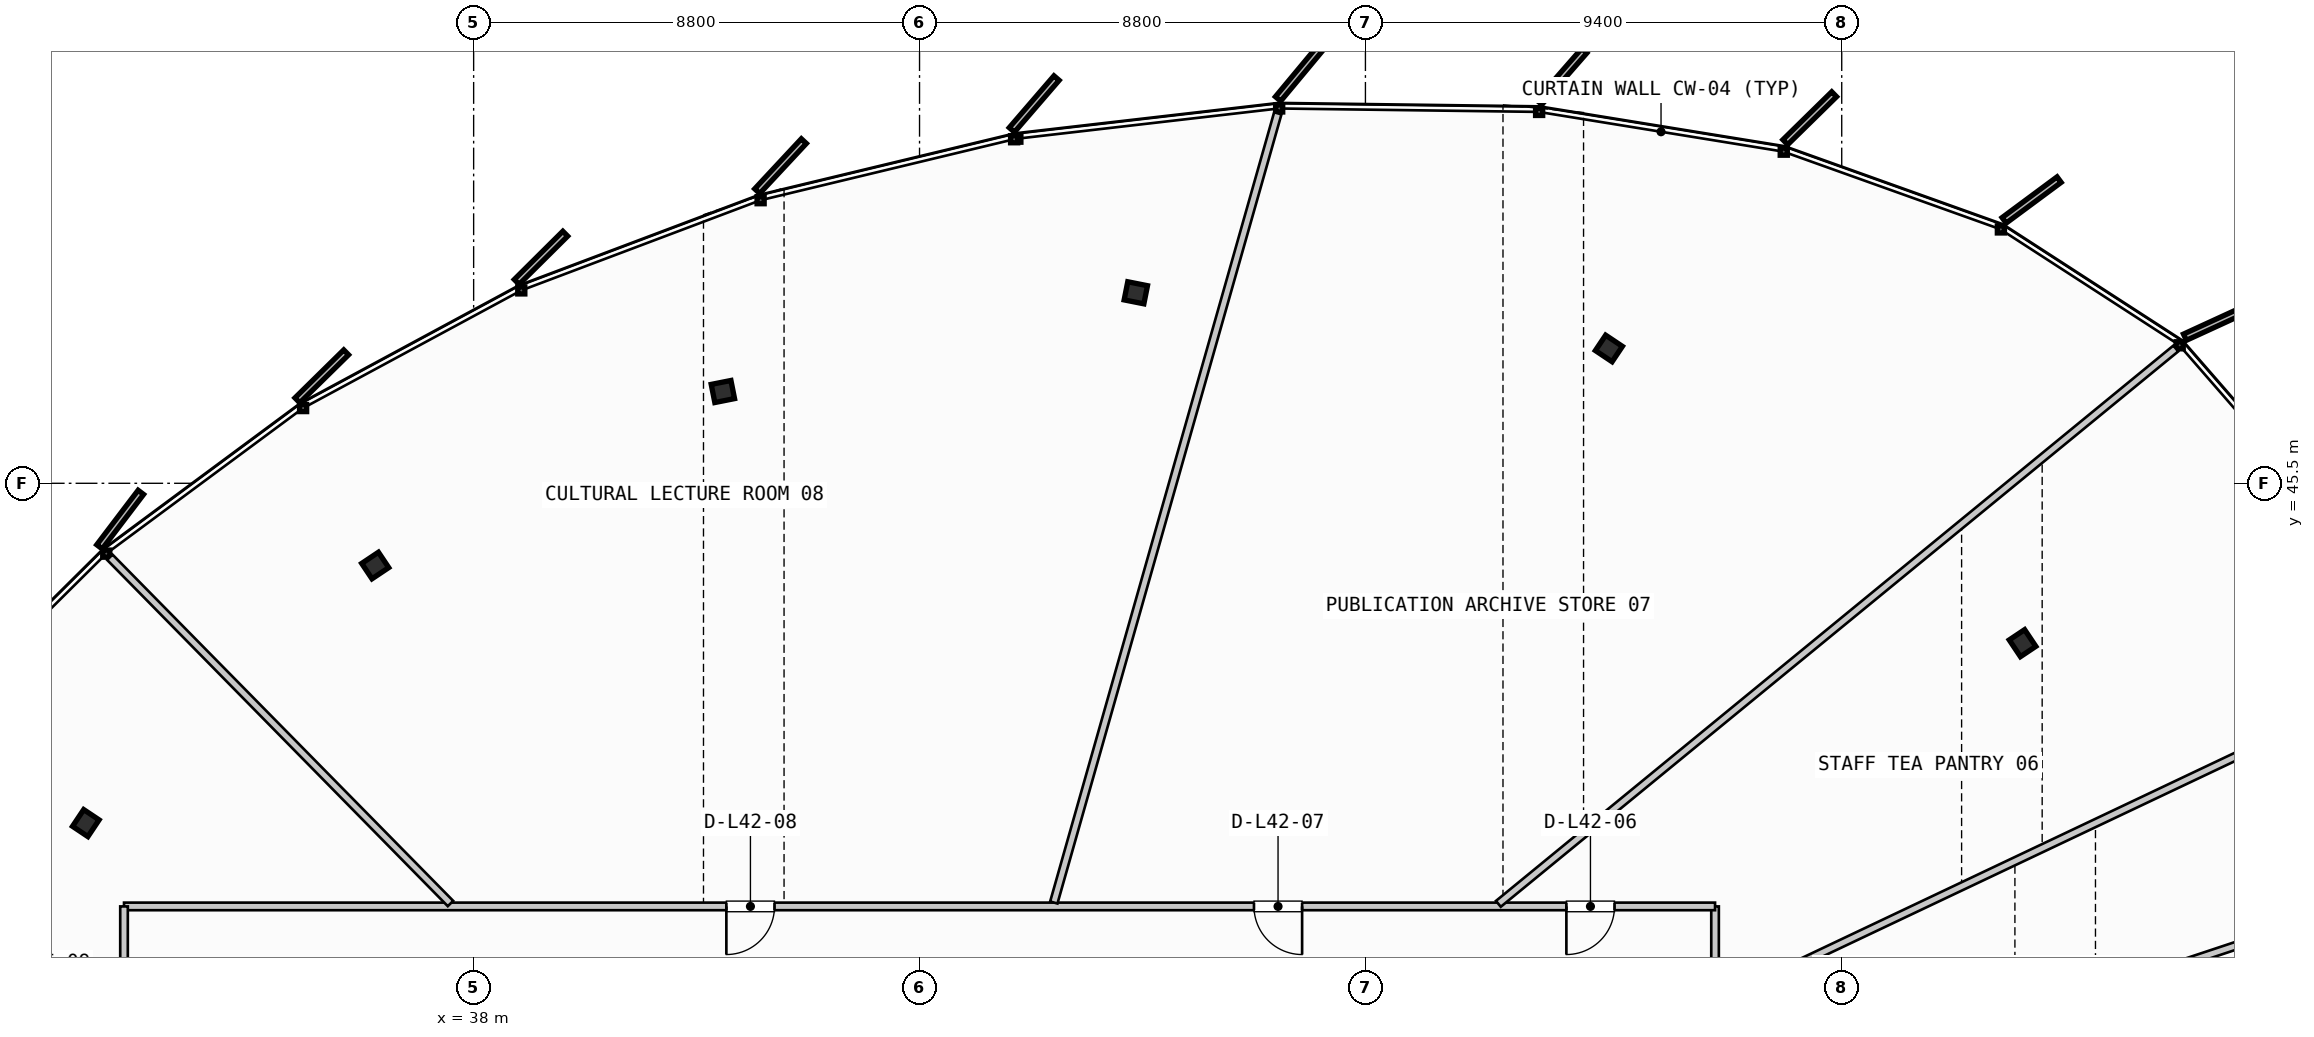
"""IFC4 building model, lengths in metres.
Left out: names, types, materials, properties, quantities, classifications, styles, units other than length and angle.
Written with IfcOpenShell. Run it as: python <this file> out.ifc"""

import sys

from ifc_helpers import new_model, si_unit, direction, frame, frame_2d, origin, origin_2d, place, context, subcontext, project, spatial, rectangle, i_section, extrude, source, transform, mapped, element, fill, save


model = new_model("IFC4")
c1 = context("Model", 3, precision=1e-05, world=origin(), true_north=direction((0.0, 1.0)))
c2 = subcontext(c1, "Body", "Model", "MODEL_VIEW")
j1 = project(units=[si_unit("LENGTHUNIT", "METRE"), si_unit("PLANEANGLEUNIT", "RADIAN")], contexts=[c1])
p1 = place(None, origin())
s1 = spatial("IfcSite", under=j1, at=p1, CompositionType="ELEMENT")
p2 = place(p1, origin())
s2 = spatial("IfcBuilding", under=s1, at=p2, CompositionType="ELEMENT")
p3 = place(p2, frame((0.0, 0.0, 164.3)))
s3 = spatial("IfcBuildingStorey", under=s2, at=p3, CompositionType="ELEMENT", Elevation=164.3)
m1 = source(origin(), c2, "Body", "SweptSolid", [
    extrude(i_section(OverallWidth=0.397, OverallDepth=0.365, WebThickness=0.028, FlangeThickness=0.044, FilletRadius=0.015, at=origin_2d()), origin(), (0.0, 0.0, 1.0), 3.3),
])
for number, where, z_axis, x_axis in (
    (1, (68.569, 42.345, 0.0), (0.0, 0.0, 1.0), (0.831, 0.556, 0.0)),
    (2, (60.405, 48.161, 0.0), (0.0, 0.0, 1.0), (0.556, 0.831, 0.0)),
    (3, (51.069, 49.259, 0.0), (0.0, 0.0, 1.0), (0.195, 0.981, 0.0)),
    (4, (42.919, 47.311, 0.0), (0.0, 0.0, 1.0), (-0.195, 0.981, 0.0)),
    (5, (36.058, 43.877, 0.0), (0.0, 0.0, 1.0), (-0.556, 0.831, 0.0)),
    (6, (30.346, 38.794, 0.0), (0.0, 0.0, 1.0), (-0.831, 0.556, 0.0)),
):
    element("IfcColumn", number, at=place(p3, frame(where, z_axis=z_axis, x_axis=x_axis)), inside=s3, PredefinedType="COLUMN", context=c2, shape_type="MappedRepresentation", body=[
        mapped(m1, transform((0.0, 0.0, 0.0), scale=1.0)),
    ])
p4 = place(p3, frame((62.5, 35.45, 0.0), z_axis=(0.0, 0.0, 1.0), x_axis=(0.0, 1.0, 0.0)))
e7 = element("IfcWall", 7, at=p4, inside=s3, PredefinedType="PARTITIONING", context=c2, shape_type="SweptSolid", body=[
    extrude(rectangle(XDim=1.7, YDim=0.15, at=frame_2d((0.85, 0.0))), origin(), (0.0, 0.0, 1.0), 2.28),
])
p5 = place(p3, frame((62.5, 37.15, 0.0), z_axis=(0.0, 0.0, 1.0), x_axis=(-1.0, 0.0, 0.0)))
e8 = element("IfcWall", 8, at=p5, inside=s3, PredefinedType="PARTITIONING", context=c2, shape_type="SweptSolid", body=[
    extrude(rectangle(XDim=31.4, YDim=0.15, at=frame_2d((15.7, 0.0))), origin(), (0.0, 0.0, 1.0), 2.28),
])
p6 = place(p5, frame((1.984, 0.0, 0.0)))
e9 = element("IfcOpeningElement", 9, at=p6, cuts=e8, PredefinedType="OPENING", context=c2, shape_type="SweptSolid", body=[
    extrude(rectangle(XDim=0.95, YDim=2.15, at=frame_2d((0.475, 1.075))), frame((0.0, 0.085, 0.0), z_axis=(0.0, -1.0, 0.0), x_axis=(1.0, 0.0, 0.0)), (0.0, 0.0, 1.0), 0.17),
])
p7 = place(p5, frame((8.15, 0.0, 0.0)))
e10 = element("IfcOpeningElement", 10, at=p7, cuts=e8, PredefinedType="OPENING", context=c2, shape_type="SweptSolid", body=[
    extrude(rectangle(XDim=0.95, YDim=2.15, at=frame_2d((0.475, 1.075))), frame((0.0, 0.085, 0.0), z_axis=(0.0, -1.0, 0.0), x_axis=(1.0, 0.0, 0.0)), (0.0, 0.0, 1.0), 0.17),
])
p8 = place(p5, frame((18.562, 0.0, 0.0)))
e11 = element("IfcOpeningElement", 11, at=p8, cuts=e8, PredefinedType="OPENING", context=c2, shape_type="SweptSolid", body=[
    extrude(rectangle(XDim=0.95, YDim=2.15, at=frame_2d((0.475, 1.075))), frame((0.0, 0.085, 0.0), z_axis=(0.0, -1.0, 0.0), x_axis=(1.0, 0.0, 0.0)), (0.0, 0.0, 1.0), 0.17),
])
p9 = place(p3, frame((31.1, 37.15, 0.0), z_axis=(0.0, 0.0, 1.0), x_axis=(0.0, -1.0, 0.0)))
e12 = element("IfcWall", 12, at=p9, inside=s3, PredefinedType="PARTITIONING", context=c2, shape_type="SweptSolid", body=[
    extrude(rectangle(XDim=1.7, YDim=0.15, at=frame_2d((0.85, 0.0))), origin(), (0.0, 0.0, 1.0), 2.28),
])
p10 = place(p3, frame((61.276, 32.554, 0.0), z_axis=(0.0, 0.0, 1.0), x_axis=(0.949028521905, 0.315190203863, 0.0)))
e13 = element("IfcWall", 13, at=p10, inside=s3, PredefinedType="PARTITIONING", context=c2, shape_type="SweptSolid", body=[
    extrude(rectangle(XDim=14.544, YDim=0.15, at=frame_2d((7.272, 0.0))), origin(), (0.0, 0.0, 1.0), 2.28),
])
p11 = place(p3, frame((61.272, 34.656, 0.0), z_axis=(0.0, 0.0, 1.0), x_axis=(0.903643729572, 0.428284963552, 0.0)))
e14 = element("IfcWall", 14, at=p11, inside=s3, PredefinedType="PARTITIONING", context=c2, shape_type="SweptSolid", body=[
    extrude(rectangle(XDim=16.062, YDim=0.15, at=frame_2d((8.031, 0.0))), origin(), (0.0, 0.0, 1.0), 2.28),
])
p12 = place(p3, frame((58.224, 37.201, 0.0), z_axis=(0.0, 0.0, 1.0), x_axis=(0.773366110677, 0.633959666585, 0.0)))
e15 = element("IfcWall", 15, at=p12, inside=s3, PredefinedType="PARTITIONING", context=c2, shape_type="SweptSolid", body=[
    extrude(rectangle(XDim=17.287, YDim=0.15, at=frame_2d((8.644, 0.0))), origin(), (0.0, 0.0, 1.0), 2.28),
])
p13 = place(p3, frame((49.45, 37.227, 0.0), z_axis=(0.0, 0.0, 1.0), x_axis=(0.273047629531, 0.962000515596, 0.0)))
e16 = element("IfcWall", 16, at=p13, inside=s3, PredefinedType="PARTITIONING", context=c2, shape_type="SweptSolid", body=[
    extrude(rectangle(XDim=16.189, YDim=0.15, at=frame_2d((8.095, 0.0))), origin(), (0.0, 0.0, 1.0), 2.28),
])
p14 = place(p3, frame((37.543, 37.207, 0.0), z_axis=(0.0, 0.0, 1.0), x_axis=(-0.701353343618, 0.71281378171, 0.0)))
e17 = element("IfcWall", 17, at=p14, inside=s3, PredefinedType="PARTITIONING", context=c2, shape_type="SweptSolid", body=[
    extrude(rectangle(XDim=9.586, YDim=0.15, at=frame_2d((4.793, 0.0))), origin(), (0.0, 0.0, 1.0), 2.28),
])
m2 = source(origin(), c2, "Body", "SweptSolid", [
    extrude(rectangle(XDim=0.95, YDim=2.15, at=frame_2d((0.475, 1.075))), frame((0.0, 0.025, 0.0), z_axis=(0.0, -1.0, 0.0), x_axis=(1.0, 0.0, 0.0)), (0.0, 0.0, 1.0), 0.05),
])
p15 = place(p6, origin())
e18 = element("IfcDoor", 18, at=p15, inside=s3, OperationType="SINGLE_SWING_RIGHT", PredefinedType="DOOR", context=c2, shape_type="MappedRepresentation", body=[
    mapped(m2, transform((0.0, 0.0, 0.0), scale=1.0)),
])
fill(e9, e18)
p16 = place(p7, origin())
e19 = element("IfcDoor", 19, at=p16, inside=s3, OperationType="SINGLE_SWING_LEFT", PredefinedType="DOOR", context=c2, shape_type="MappedRepresentation", body=[
    mapped(m2, transform((0.0, 0.0, 0.0), scale=1.0)),
])
fill(e10, e19)
p17 = place(p8, origin())
e20 = element("IfcDoor", 20, at=p17, inside=s3, OperationType="SINGLE_SWING_RIGHT", PredefinedType="DOOR", context=c2, shape_type="MappedRepresentation", body=[
    mapped(m2, transform((0.0, 0.0, 0.0), scale=1.0)),
])
fill(e11, e20)
save(model, sys.argv[1])
